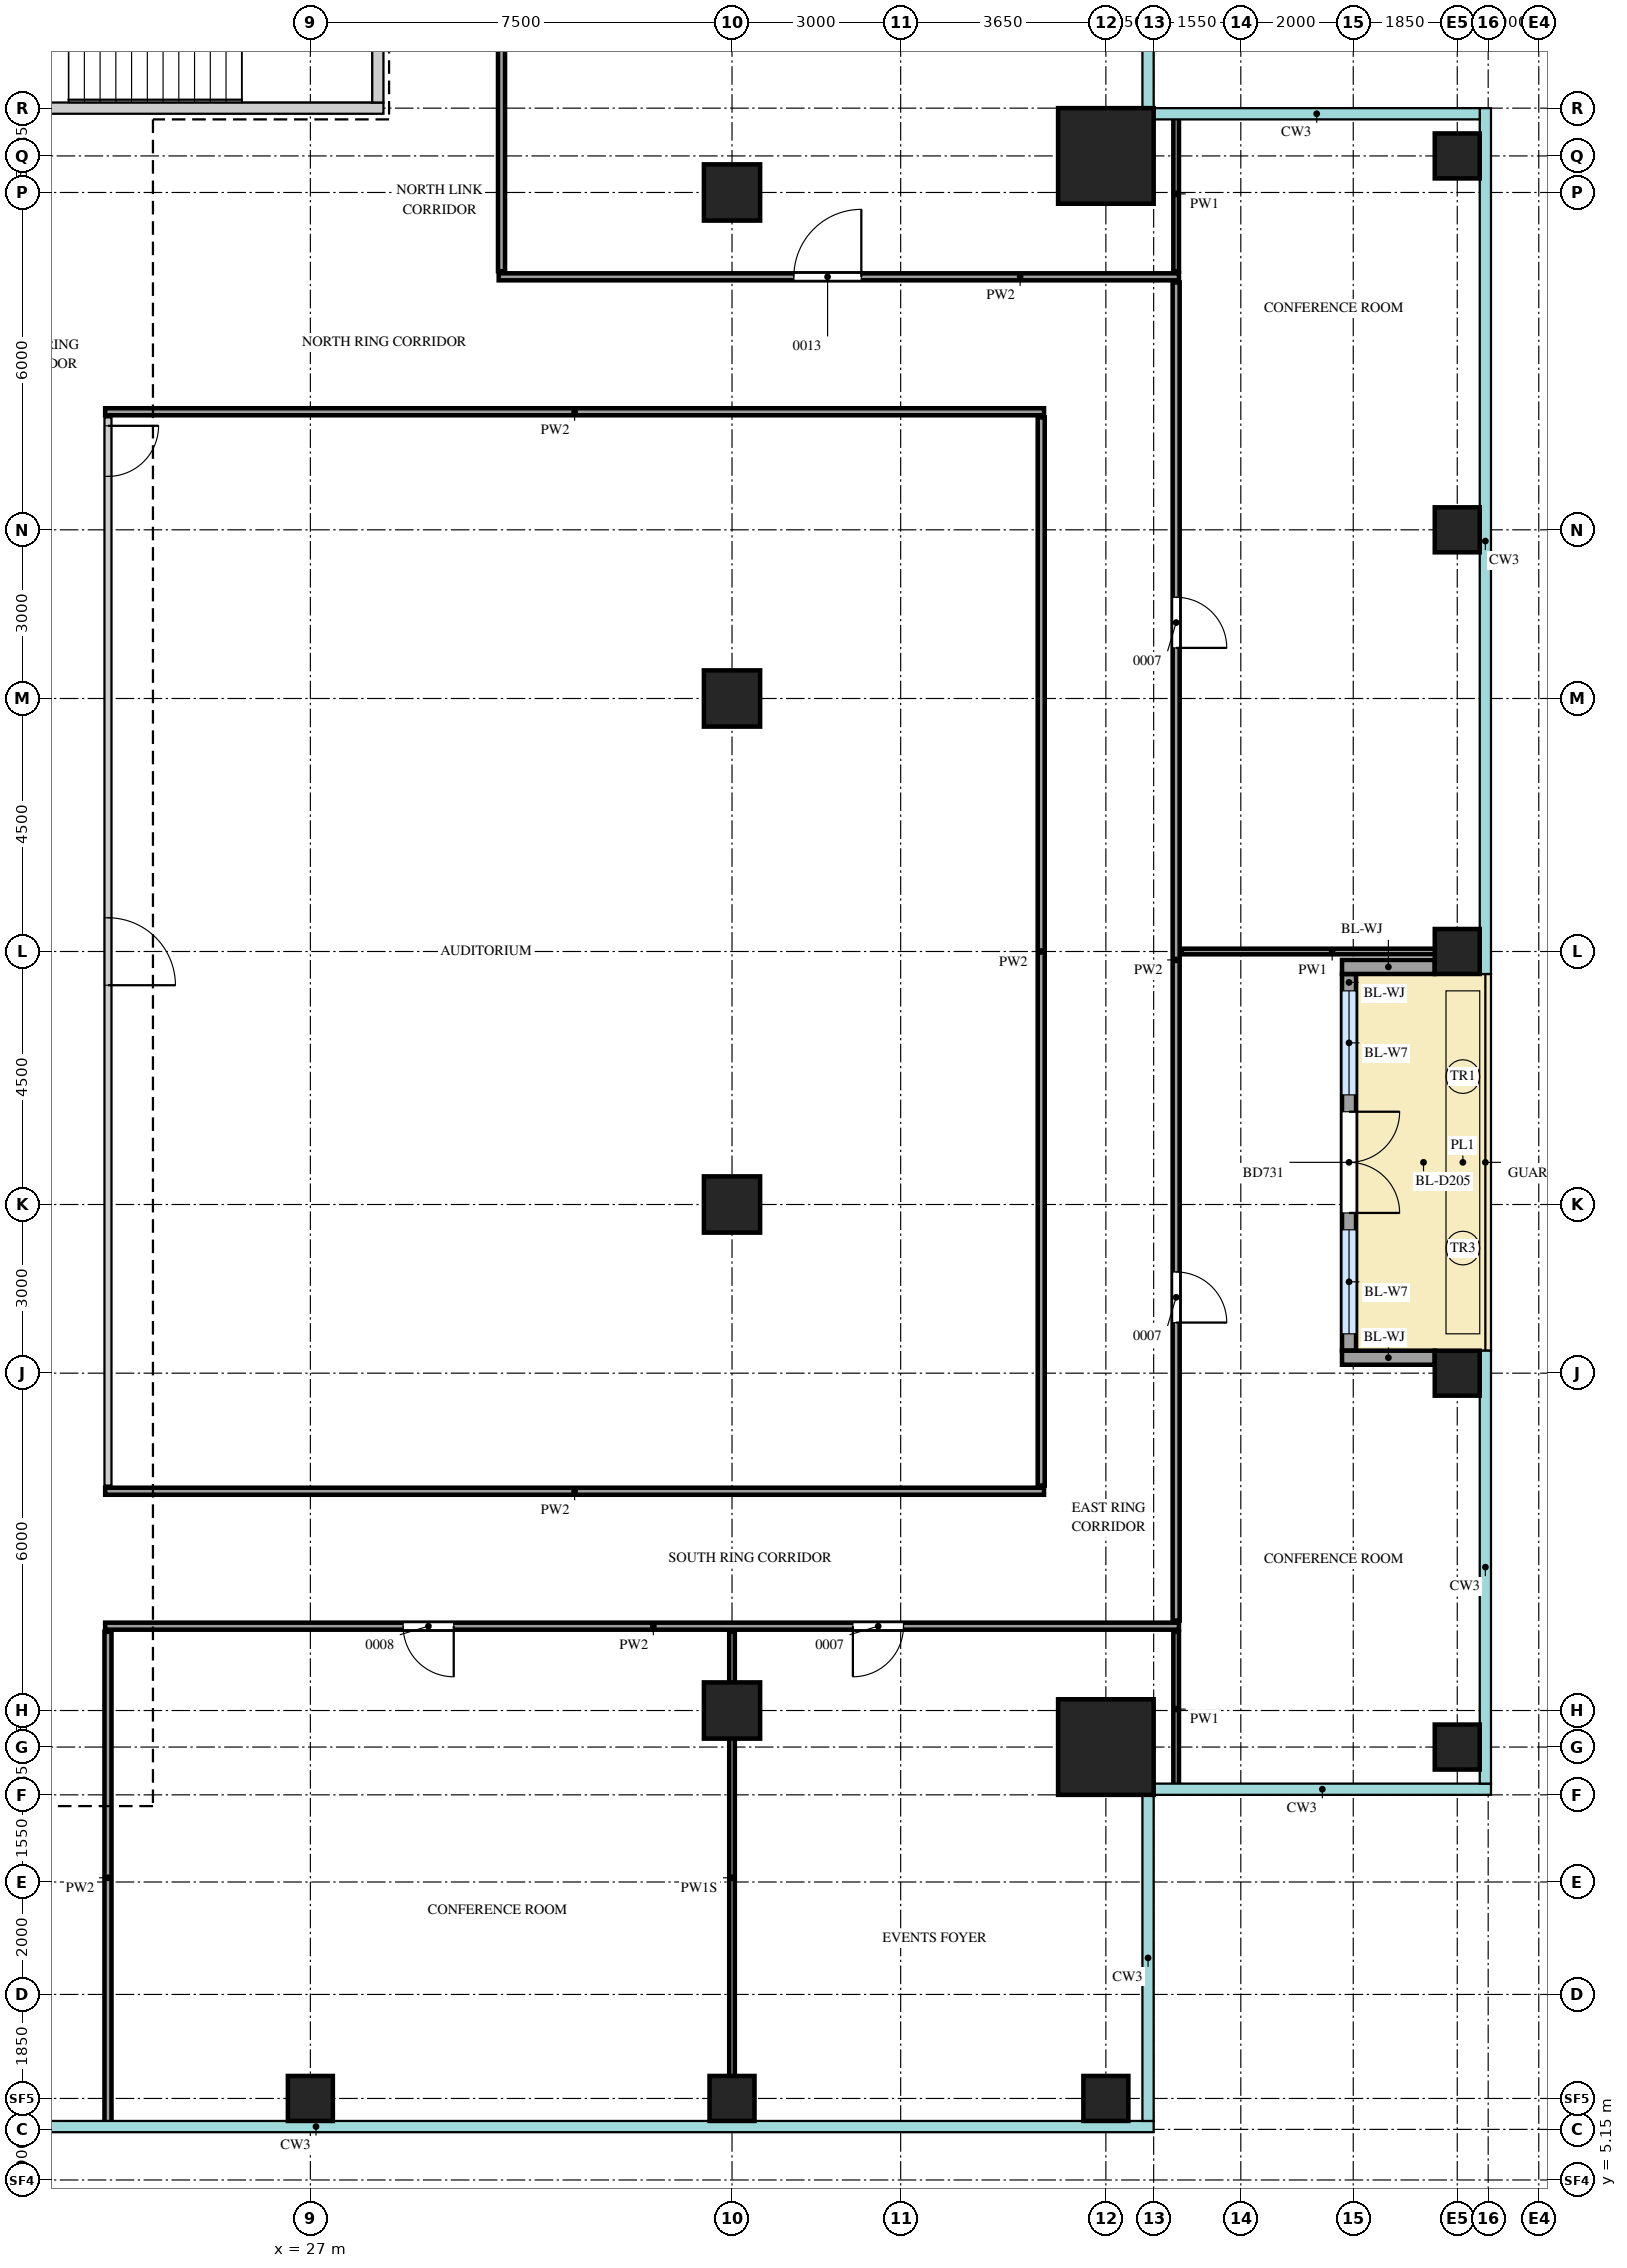
"""IFC4 building model, lengths in metres.
Left out: names, types, materials, properties, quantities, classifications, styles, units other than length and angle.
Written with IfcOpenShell. Run it as: python <this file> out.ifc"""

import sys

from ifc_helpers import new_model, si_unit, direction, frame, frame_2d, origin, origin_2d, place, context, subcontext, project, spatial, rectangle, extrude, source, transform, mapped, element, fill, save


model = new_model("IFC4")
c1 = context("Model", 3, precision=1e-05, world=origin(), true_north=direction((0.0, 1.0)))
c2 = subcontext(c1, "Body", "Model", "MODEL_VIEW")
j1 = project(units=[si_unit("LENGTHUNIT", "METRE"), si_unit("PLANEANGLEUNIT", "RADIAN")], contexts=[c1])
p1 = place(None, origin())
s1 = spatial("IfcSite", under=j1, at=p1, CompositionType="ELEMENT")
p2 = place(p1, origin())
s2 = spatial("IfcBuilding", under=s1, at=p2, CompositionType="ELEMENT")
p3 = place(p2, frame((0.0, 0.0, 322.2)))
s3 = spatial("IfcBuildingStorey", under=s2, at=p3, CompositionType="ELEMENT", Elevation=322.2)
m1 = source(origin(), c2, "Body", "SweptSolid", [
    extrude(rectangle(XDim=7.1, YDim=0.2, at=frame_2d((3.55, 0.0))), origin(), (0.0, 0.0, 1.0), 3.75),
])
p4 = place(p3, frame((21.2, 42.0, 0.0), z_axis=(0.0, 0.0, 1.0), x_axis=(1.0, 0.0, 0.0)))
e1 = element("IfcWall", 1, at=p4, inside=s3, PredefinedType="SHEAR", context=c2, shape_type="MappedRepresentation", body=[
    mapped(m1, transform((0.0, 0.0, 0.0))),
])
m2 = source(origin(), c2, "Body", "SweptSolid", [
    extrude(rectangle(XDim=3.35, YDim=0.2, at=frame_2d((1.675, 0.0))), origin(), (0.0, 0.0, 1.0), 3.75),
])
p5 = place(p3, frame((28.2, 42.1, 0.0), z_axis=(0.0, 0.0, 1.0), x_axis=(0.0, 1.0, 0.0)))
e2 = element("IfcWall", 2, at=p5, inside=s3, PredefinedType="SHEAR", context=c2, shape_type="MappedRepresentation", body=[
    mapped(m2, transform((0.0, 0.0, 0.0))),
])
m3 = source(origin(), c2, "Body", "SweptSolid", [
    extrude(rectangle(XDim=1.7, YDim=1.7, at=origin_2d()), origin(), (0.0, 0.0, 1.0), 3.75),
])
for number, where, z_axis, x_axis in (
    (3, (41.15, 41.15, 0.0), (0.0, 0.0, 1.0), (1.0, 0.0, 0.0)),
    (4, (41.15, 12.85, 0.0), (0.0, 0.0, 1.0), (1.0, 0.0, 0.0)),
):
    element("IfcColumn", number, at=place(p3, frame(where, z_axis=z_axis, x_axis=x_axis)), inside=s3, PredefinedType="COLUMN", context=c2, shape_type="MappedRepresentation", body=[
        mapped(m3, transform((0.0, 0.0, 0.0))),
    ])
m4 = source(origin(), c2, "Body", "SweptSolid", [
    extrude(rectangle(XDim=0.8, YDim=0.8, at=origin_2d()), origin(), (0.0, 0.0, 1.0), 3.75),
])
for number, where, z_axis, x_axis in (
    (5, (27.0, 6.6, 0.0), (0.0, 0.0, 1.0), (1.0, 0.0, 0.0)),
    (6, (34.5, 6.6, 0.0), (0.0, 0.0, 1.0), (1.0, 0.0, 0.0)),
    (7, (41.15, 6.6, 0.0), (0.0, 0.0, 1.0), (1.0, 0.0, 0.0)),
    (8, (47.4, 12.85, 0.0), (0.0, 0.0, 1.0), (1.0, 0.0, 0.0)),
    (9, (47.4, 19.5, 0.0), (0.0, 0.0, 1.0), (1.0, 0.0, 0.0)),
    (10, (47.4, 27.0, 0.0), (0.0, 0.0, 1.0), (1.0, 0.0, 0.0)),
    (11, (47.4, 34.5, 0.0), (0.0, 0.0, 1.0), (1.0, 0.0, 0.0)),
    (12, (47.4, 41.15, 0.0), (0.0, 0.0, 1.0), (1.0, 0.0, 0.0)),
):
    element("IfcColumn", number, at=place(p3, frame(where, z_axis=z_axis, x_axis=x_axis)), inside=s3, PredefinedType="COLUMN", context=c2, shape_type="MappedRepresentation", body=[
        mapped(m4, transform((0.0, 0.0, 0.0))),
    ])
m5 = source(origin(), c2, "Body", "SweptSolid", [
    extrude(rectangle(XDim=1.0, YDim=1.0, at=origin_2d()), origin(), (0.0, 0.0, 1.0), 3.75),
])
for number, where, z_axis, x_axis in (
    (13, (34.5, 13.5, 0.0), (0.0, 0.0, 1.0), (1.0, 0.0, 0.0)),
    (14, (34.5, 22.5, 0.0), (0.0, 0.0, 1.0), (1.0, 0.0, 0.0)),
    (15, (34.5, 31.5, 0.0), (0.0, 0.0, 1.0), (1.0, 0.0, 0.0)),
    (16, (34.5, 40.5, 0.0), (0.0, 0.0, 1.0), (1.0, 0.0, 0.0)),
):
    element("IfcColumn", number, at=place(p3, frame(where, z_axis=z_axis, x_axis=x_axis)), inside=s3, PredefinedType="COLUMN", context=c2, shape_type="MappedRepresentation", body=[
        mapped(m5, transform((0.0, 0.0, 0.0))),
    ])
m6 = source(origin(), c2, "Body", "SweptSolid", [
    extrude(rectangle(XDim=6.7, YDim=0.25, at=frame_2d((3.35, 0.0))), origin(), (0.0, 0.0, 1.0), 3.2),
])
p6 = place(p3, frame((45.475, 19.9, 0.0), z_axis=(0.0, 0.0, 1.0), x_axis=(0.0, 1.0, 0.0)))
e17 = element("IfcWall", 17, at=p6, inside=s3, PredefinedType="SOLIDWALL", context=c2, shape_type="MappedRepresentation", body=[
    mapped(m6, transform((0.0, 0.0, 0.0))),
])
m7 = source(origin(), c2, "Body", "SweptSolid", [
    extrude(rectangle(XDim=1.85, YDim=2.4, at=frame_2d((0.925, 1.2))), frame((0.0, 0.135, 0.0), z_axis=(0.0, -1.0, 0.0), x_axis=(1.0, 0.0, 0.0)), (0.0, 0.0, 1.0), 0.27),
])
p7 = place(p6, frame((0.3, 0.0, 0.0)))
e18 = element("IfcOpeningElement", 18, at=p7, cuts=e17, PredefinedType="OPENING", context=c2, shape_type="MappedRepresentation", body=[
    mapped(m7, transform((0.0, 0.0, 0.0))),
])
p8 = place(p6, frame((4.55, 0.0, 0.0)))
e19 = element("IfcOpeningElement", 19, at=p8, cuts=e17, PredefinedType="OPENING", context=c2, shape_type="MappedRepresentation", body=[
    mapped(m7, transform((0.0, 0.0, 0.0))),
])
m8 = source(origin(), c2, "Body", "SweptSolid", [
    extrude(rectangle(XDim=1.8, YDim=2.4, at=frame_2d((0.9, 1.2))), frame((0.0, 0.135, 0.0), z_axis=(0.0, -1.0, 0.0), x_axis=(1.0, 0.0, 0.0)), (0.0, 0.0, 1.0), 0.27),
])
p9 = place(p6, frame((2.45, 0.0, 0.0)))
e20 = element("IfcOpeningElement", 20, at=p9, cuts=e17, PredefinedType="OPENING", context=c2, shape_type="MappedRepresentation", body=[
    mapped(m8, transform((0.0, 0.0, 0.0))),
])
m9 = source(origin(), c2, "Body", "SweptSolid", [
    extrude(rectangle(XDim=1.65, YDim=0.25, at=frame_2d((0.825, 0.0))), origin(), (0.0, 0.0, 1.0), 3.2),
])
for number, where, z_axis, x_axis in (
    (21, (47.0, 19.775, 0.0), (0.0, 0.0, 1.0), (-1.0, 0.0, 0.0)),
    (22, (47.0, 26.725, 0.0), (0.0, 0.0, 1.0), (-1.0, 0.0, 0.0)),
):
    element("IfcWall", number, at=place(p3, frame(where, z_axis=z_axis, x_axis=x_axis)), inside=s3, PredefinedType="SOLIDWALL", context=c2, shape_type="MappedRepresentation", body=[
        mapped(m9, transform((0.0, 0.0, 0.0))),
    ])
m10 = source(origin(), c2, "Body", "SweptSolid", [
    extrude(rectangle(XDim=8.75, YDim=0.125, at=frame_2d((4.375, 0.0))), origin(), (0.0, 0.0, 1.0), 3.8),
])
p10 = place(p3, frame((23.4, 6.15, 0.0), z_axis=(0.0, 0.0, 1.0), x_axis=(0.0, 1.0, 0.0)))
e23 = element("IfcWall", 23, at=p10, inside=s3, PredefinedType="PARTITIONING", context=c2, shape_type="MappedRepresentation", body=[
    mapped(m10, transform((0.0, 0.0, 0.0))),
])
m11 = source(origin(), c2, "Body", "SweptSolid", [
    extrude(rectangle(XDim=8.75, YDim=0.1, at=frame_2d((4.375, 0.0))), origin(), (0.0, 0.0, 1.0), 3.35),
])
p11 = place(p3, frame((34.5, 6.15, 0.0), z_axis=(0.0, 0.0, 1.0), x_axis=(0.0, 1.0, 0.0)))
e24 = element("IfcWall", 24, at=p11, inside=s3, PredefinedType="PARTITIONING", context=c2, shape_type="MappedRepresentation", body=[
    mapped(m11, transform((0.0, 0.0, 0.0))),
])
m12 = source(origin(), c2, "Body", "SweptSolid", [
    extrude(rectangle(XDim=2.75, YDim=0.1, at=frame_2d((1.375, 0.0))), origin(), (0.0, 0.0, 1.0), 3.8),
])
p12 = place(p3, frame((42.4, 12.15, 0.0), z_axis=(0.0, 0.0, 1.0), x_axis=(0.0, 1.0, 0.0)))
e25 = element("IfcWall", 25, at=p12, inside=s3, PredefinedType="PARTITIONING", context=c2, shape_type="MappedRepresentation", body=[
    mapped(m12, transform((0.0, 0.0, 0.0))),
])
m13 = source(origin(), c2, "Body", "SweptSolid", [
    extrude(rectangle(XDim=19.1, YDim=0.125, at=frame_2d((9.55, 0.0))), origin(), (0.0, 0.0, 1.0), 3.8),
])
p13 = place(p3, frame((23.35, 15.0, 0.0), z_axis=(0.0, 0.0, 1.0), x_axis=(1.0, 0.0, 0.0)))
e26 = element("IfcWall", 26, at=p13, inside=s3, PredefinedType="PARTITIONING", context=c2, shape_type="MappedRepresentation", body=[
    mapped(m13, transform((0.0, 0.0, 0.0))),
])
m14 = source(origin(), c2, "Body", "SweptSolid", [
    extrude(rectangle(XDim=0.9, YDim=2.1, at=frame_2d((0.45, 1.05))), frame((0.0, 0.073, 0.0), z_axis=(0.0, -1.0, 0.0), x_axis=(1.0, 0.0, 0.0)), (0.0, 0.0, 1.0), 0.145),
])
p14 = place(p13, frame((5.3, 0.0, 0.0)))
e27 = element("IfcOpeningElement", 27, at=p14, cuts=e26, PredefinedType="OPENING", context=c2, shape_type="MappedRepresentation", body=[
    mapped(m14, transform((0.0, 0.0, 0.0))),
])
p15 = place(p13, frame((13.3, 0.0, 0.0)))
e28 = element("IfcOpeningElement", 28, at=p15, cuts=e26, PredefinedType="OPENING", context=c2, shape_type="MappedRepresentation", body=[
    mapped(m14, transform((0.0, 0.0, 0.0))),
])
m15 = source(origin(), c2, "Body", "SweptSolid", [
    extrude(rectangle(XDim=23.8, YDim=0.125, at=frame_2d((11.9, 0.0))), origin(), (0.0, 0.0, 1.0), 3.8),
])
p16 = place(p3, frame((42.4, 15.1, 0.0), z_axis=(0.0, 0.0, 1.0), x_axis=(0.0, 1.0, 0.0)))
e29 = element("IfcWall", 29, at=p16, inside=s3, PredefinedType="PARTITIONING", context=c2, shape_type="MappedRepresentation", body=[
    mapped(m15, transform((0.0, 0.0, 0.0))),
])
p17 = place(p16, frame((5.3, 0.0, 0.0)))
e30 = element("IfcOpeningElement", 30, at=p17, cuts=e29, PredefinedType="OPENING", context=c2, shape_type="MappedRepresentation", body=[
    mapped(m14, transform((0.0, 0.0, 0.0))),
])
p18 = place(p16, frame((17.3, 0.0, 0.0)))
e31 = element("IfcOpeningElement", 31, at=p18, cuts=e29, PredefinedType="OPENING", context=c2, shape_type="MappedRepresentation", body=[
    mapped(m14, transform((0.0, 0.0, 0.0))),
])
m16 = source(origin(), c2, "Body", "SweptSolid", [
    extrude(rectangle(XDim=16.7, YDim=0.125, at=frame_2d((8.35, 0.0))), origin(), (0.0, 0.0, 1.0), 3.8),
])
p19 = place(p3, frame((23.35, 17.4, 0.0), z_axis=(0.0, 0.0, 1.0), x_axis=(1.0, 0.0, 0.0)))
e32 = element("IfcWall", 32, at=p19, inside=s3, PredefinedType="PARTITIONING", context=c2, shape_type="MappedRepresentation", body=[
    mapped(m16, transform((0.0, 0.0, 0.0))),
])
m17 = source(origin(), c2, "Body", "SweptSolid", [
    extrude(rectangle(XDim=19.0, YDim=0.125, at=frame_2d((9.5, 0.0))), origin(), (0.0, 0.0, 1.0), 3.8),
])
p20 = place(p3, frame((23.4, 17.5, 0.0), z_axis=(0.0, 0.0, 1.0), x_axis=(0.0, 1.0, 0.0)))
e33 = element("IfcWall", 33, at=p20, inside=s3, PredefinedType="PARTITIONING", context=c2, shape_type="MappedRepresentation", body=[
    mapped(m17, transform((0.0, 0.0, 0.0))),
])
m18 = source(origin(), c2, "Body", "SweptSolid", [
    extrude(rectangle(XDim=1.2, YDim=2.1, at=frame_2d((0.6, 1.05))), frame((0.0, 0.073, 0.0), z_axis=(0.0, -1.0, 0.0), x_axis=(1.0, 0.0, 0.0)), (0.0, 0.0, 1.0), 0.145),
])
p21 = place(p20, frame((8.9, 0.0, 0.0)))
e34 = element("IfcOpeningElement", 34, at=p21, cuts=e33, PredefinedType="OPENING", context=c2, shape_type="MappedRepresentation", body=[
    mapped(m18, transform((0.0, 0.0, 0.0))),
])
p22 = place(p20, frame((17.95, 0.0, 0.0)))
e35 = element("IfcOpeningElement", 35, at=p22, cuts=e33, PredefinedType="OPENING", context=c2, shape_type="MappedRepresentation", body=[
    mapped(m14, transform((0.0, 0.0, 0.0))),
])
p23 = place(p3, frame((40.0, 17.5, 0.0), z_axis=(0.0, 0.0, 1.0), x_axis=(0.0, 1.0, 0.0)))
e36 = element("IfcWall", 36, at=p23, inside=s3, PredefinedType="PARTITIONING", context=c2, shape_type="MappedRepresentation", body=[
    mapped(m17, transform((0.0, 0.0, 0.0))),
])
m19 = source(origin(), c2, "Body", "SweptSolid", [
    extrude(rectangle(XDim=5.35, YDim=0.1, at=frame_2d((2.675, 0.0))), origin(), (0.0, 0.0, 1.0), 3.8),
])
p24 = place(p3, frame((42.5, 27.0, 0.0), z_axis=(0.0, 0.0, 1.0), x_axis=(1.0, 0.0, 0.0)))
e37 = element("IfcWall", 37, at=p24, inside=s3, PredefinedType="PARTITIONING", context=c2, shape_type="MappedRepresentation", body=[
    mapped(m19, transform((0.0, 0.0, 0.0))),
])
p25 = place(p3, frame((23.35, 36.6, 0.0), z_axis=(0.0, 0.0, 1.0), x_axis=(1.0, 0.0, 0.0)))
e38 = element("IfcWall", 38, at=p25, inside=s3, PredefinedType="PARTITIONING", context=c2, shape_type="MappedRepresentation", body=[
    mapped(m16, transform((0.0, 0.0, 0.0))),
])
m20 = source(origin(), c2, "Body", "SweptSolid", [
    extrude(rectangle(XDim=12.1, YDim=0.125, at=frame_2d((6.05, 0.0))), origin(), (0.0, 0.0, 1.0), 3.8),
])
p26 = place(p3, frame((30.35, 39.0, 0.0), z_axis=(0.0, 0.0, 1.0), x_axis=(1.0, 0.0, 0.0)))
e39 = element("IfcWall", 39, at=p26, inside=s3, PredefinedType="PARTITIONING", context=c2, shape_type="MappedRepresentation", body=[
    mapped(m20, transform((0.0, 0.0, 0.0))),
])
p27 = place(p26, frame((5.25, 0.0, 0.0)))
e40 = element("IfcOpeningElement", 40, at=p27, cuts=e39, PredefinedType="OPENING", context=c2, shape_type="MappedRepresentation", body=[
    mapped(m18, transform((0.0, 0.0, 0.0))),
])
p28 = place(p3, frame((30.4, 39.1, 0.0), z_axis=(0.0, 0.0, 1.0), x_axis=(0.0, 1.0, 0.0)))
e41 = element("IfcWall", 41, at=p28, inside=s3, PredefinedType="PARTITIONING", context=c2, shape_type="MappedRepresentation", body=[
    mapped(m10, transform((0.0, 0.0, 0.0))),
])
p29 = place(p3, frame((42.4, 39.1, 0.0), z_axis=(0.0, 0.0, 1.0), x_axis=(0.0, 1.0, 0.0)))
e42 = element("IfcWall", 42, at=p29, inside=s3, PredefinedType="PARTITIONING", context=c2, shape_type="MappedRepresentation", body=[
    mapped(m12, transform((0.0, 0.0, 0.0))),
])
m21 = source(origin(), c2, "Body", "SweptSolid", [
    extrude(rectangle(XDim=1.85, YDim=2.4, at=frame_2d((0.925, 1.2))), frame((0.0, 0.03, 0.0), z_axis=(0.0, -1.0, 0.0), x_axis=(1.0, 0.0, 0.0)), (0.0, 0.0, 1.0), 0.06),
])
p30 = place(p7, origin())
e43 = element("IfcWindow", 43, at=p30, inside=s3, PartitioningType="SINGLE_PANEL", PredefinedType="WINDOW", context=c2, shape_type="MappedRepresentation", body=[
    mapped(m21, transform((0.0, 0.0, 0.0))),
])
fill(e18, e43)
p31 = place(p8, origin())
e44 = element("IfcWindow", 44, at=p31, inside=s3, PartitioningType="SINGLE_PANEL", PredefinedType="WINDOW", context=c2, shape_type="MappedRepresentation", body=[
    mapped(m21, transform((0.0, 0.0, 0.0))),
])
fill(e19, e44)
m22 = source(origin(), c2, "Body", "SweptSolid", [
    extrude(rectangle(XDim=1.8, YDim=2.4, at=frame_2d((0.9, 1.2))), frame((0.0, 0.025, 0.0), z_axis=(0.0, -1.0, 0.0), x_axis=(1.0, 0.0, 0.0)), (0.0, 0.0, 1.0), 0.05),
])
p32 = place(p9, origin())
e45 = element("IfcDoor", 45, at=p32, inside=s3, OperationType="DOUBLE_DOOR_DOUBLE_SWING", PredefinedType="DOOR", context=c2, shape_type="MappedRepresentation", body=[
    mapped(m22, transform((0.0, 0.0, 0.0))),
])
fill(e20, e45)
m23 = source(origin(), c2, "Body", "SweptSolid", [
    extrude(rectangle(XDim=0.9, YDim=2.1, at=frame_2d((0.45, 1.05))), frame((0.0, 0.025, 0.0), z_axis=(0.0, -1.0, 0.0), x_axis=(1.0, 0.0, 0.0)), (0.0, 0.0, 1.0), 0.05),
])
p33 = place(p14, origin())
e46 = element("IfcDoor", 46, at=p33, inside=s3, OperationType="SINGLE_SWING_RIGHT", PredefinedType="DOOR", context=c2, shape_type="MappedRepresentation", body=[
    mapped(m23, transform((0.0, 0.0, 0.0))),
])
fill(e27, e46)
p34 = place(p15, origin())
e47 = element("IfcDoor", 47, at=p34, inside=s3, OperationType="SINGLE_SWING_LEFT", PredefinedType="DOOR", context=c2, shape_type="MappedRepresentation", body=[
    mapped(m23, transform((0.0, 0.0, 0.0))),
])
fill(e28, e47)
p35 = place(p17, origin())
e48 = element("IfcDoor", 48, at=p35, inside=s3, OperationType="SINGLE_SWING_LEFT", PredefinedType="DOOR", context=c2, shape_type="MappedRepresentation", body=[
    mapped(m23, transform((0.0, 0.0, 0.0))),
])
fill(e30, e48)
p36 = place(p18, origin())
e49 = element("IfcDoor", 49, at=p36, inside=s3, OperationType="SINGLE_SWING_LEFT", PredefinedType="DOOR", context=c2, shape_type="MappedRepresentation", body=[
    mapped(m23, transform((0.0, 0.0, 0.0))),
])
fill(e31, e49)
m24 = source(origin(), c2, "Body", "SweptSolid", [
    extrude(rectangle(XDim=1.2, YDim=2.1, at=frame_2d((0.6, 1.05))), frame((0.0, 0.025, 0.0), z_axis=(0.0, -1.0, 0.0), x_axis=(1.0, 0.0, 0.0)), (0.0, 0.0, 1.0), 0.05),
])
p37 = place(p27, origin())
e50 = element("IfcDoor", 50, at=p37, inside=s3, OperationType="SINGLE_SWING_LEFT", PredefinedType="DOOR", context=c2, shape_type="MappedRepresentation", body=[
    mapped(m24, transform((0.0, 0.0, 0.0))),
])
fill(e40, e50)
p38 = place(p21, origin())
e51 = element("IfcDoor", 51, at=p38, inside=s3, OperationType="SINGLE_SWING_LEFT", PredefinedType="DOOR", context=c2, shape_type="MappedRepresentation", body=[
    mapped(m24, transform((0.0, 0.0, 0.0))),
])
fill(e34, e51)
p39 = place(p22, origin())
e52 = element("IfcDoor", 52, at=p39, inside=s3, OperationType="SINGLE_SWING_RIGHT", PredefinedType="DOOR", context=c2, shape_type="MappedRepresentation", body=[
    mapped(m23, transform((0.0, 0.0, 0.0))),
])
fill(e35, e52)
save(model, sys.argv[1])
